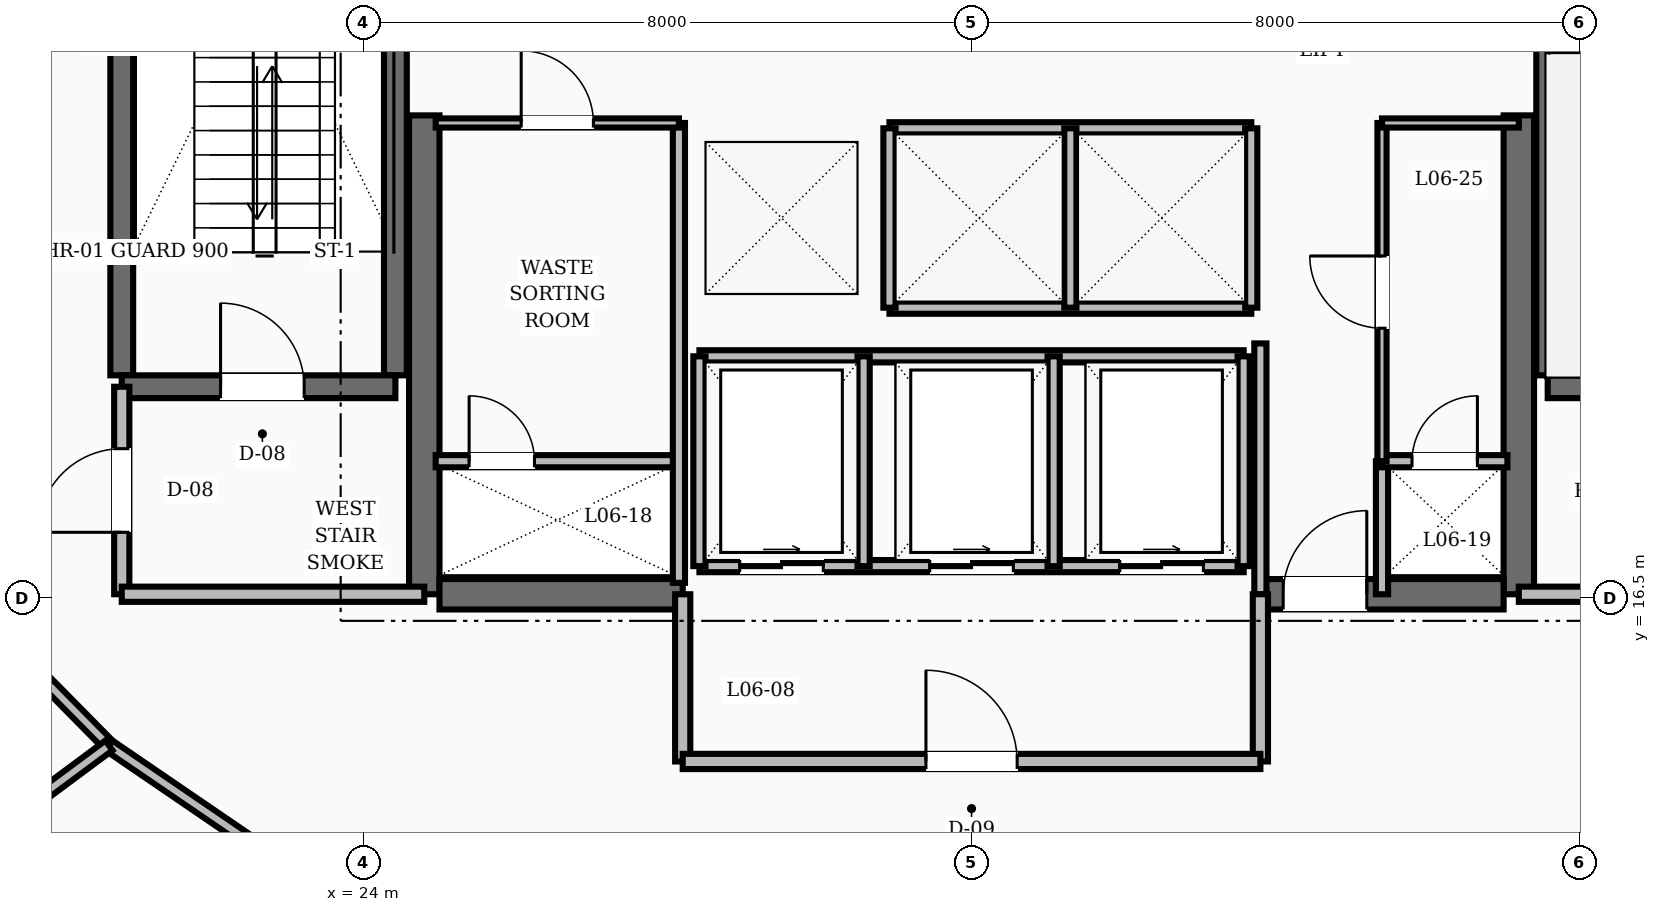
"""IFC4 building model, lengths in metres.
Left out: names, types, materials, properties, quantities, classifications, styles, units other than length and angle.
Written with IfcOpenShell. Run it as: python <this file> out.ifc"""

import sys

from ifc_helpers import new_model, si_unit, direction, frame, frame_2d, origin, place, context, subcontext, project, spatial, rectangle, extrude, element, fill, save


model = new_model("IFC4")
c1 = context("Model", 3, precision=1e-05, world=origin(), true_north=direction((0.0, 1.0)))
c2 = subcontext(c1, "Body", "Model", "MODEL_VIEW")
j1 = project(units=[si_unit("LENGTHUNIT", "METRE"), si_unit("PLANEANGLEUNIT", "RADIAN")], contexts=[c1])
p1 = place(None, origin())
s1 = spatial("IfcSite", under=j1, at=p1, CompositionType="ELEMENT")
p2 = place(p1, origin())
s2 = spatial("IfcBuilding", under=s1, at=p2, CompositionType="ELEMENT")
p3 = place(p2, frame((0.0, 0.0, 30.4)))
s3 = spatial("IfcBuildingStorey", under=s2, at=p3, CompositionType="ELEMENT", Elevation=30.4)
for number, where, z_axis, x_axis in (
    (1, (24.8, 16.55, 0.0), (0.0, 0.0, 1.0), (0.0, 1.0, 0.0)),
    (2, (39.2, 16.55, 0.0), (0.0, 0.0, 1.0), (0.0, 1.0, 0.0)),
):
    element("IfcWall", number, at=place(p3, frame(where, z_axis=z_axis, x_axis=x_axis)), inside=s3, PredefinedType="SHEAR", context=c2, shape_type="SweptSolid", body=[
        extrude(rectangle(XDim=6.3, YDim=0.4, at=frame_2d((3.15, 0.0))), origin(), (0.0, 0.0, 1.0), 3.6),
    ])
p4 = place(p3, frame((25.0, 16.55, 0.0), z_axis=(0.0, 0.0, 1.0), x_axis=(1.0, 0.0, 0.0)))
e3 = element("IfcWall", 3, at=p4, inside=s3, PredefinedType="SHEAR", context=c2, shape_type="SweptSolid", body=[
    extrude(rectangle(XDim=3.2, YDim=0.4, at=frame_2d((1.6, 0.0))), origin(), (0.0, 0.0, 1.0), 3.6),
])
p5 = place(p3, frame((35.8, 16.55, 0.0), z_axis=(0.0, 0.0, 1.0), x_axis=(1.0, 0.0, 0.0)))
e4 = element("IfcWall", 4, at=p5, inside=s3, PredefinedType="SHEAR", context=c2, shape_type="SweptSolid", body=[
    extrude(rectangle(XDim=3.2, YDim=0.4, at=frame_2d((1.6, 0.0))), origin(), (0.0, 0.0, 1.0), 3.6),
])
p6 = place(p5, frame((0.3, 0.0, 0.0)))
e5 = element("IfcOpeningElement", 5, at=p6, cuts=e4, PredefinedType="OPENING", context=c2, shape_type="SweptSolid", body=[
    extrude(rectangle(XDim=1.1, YDim=2.1, at=frame_2d((0.55, 1.05))), frame((0.0, 0.21, 0.0), z_axis=(0.0, -1.0, 0.0), x_axis=(1.0, 0.0, 0.0)), (0.0, 0.0, 1.0), 0.42),
])
for number, where, z_axis, x_axis in (
    (6, (20.82, 19.43, 0.0), (0.0, 0.0, 1.0), (0.0, 1.0, 0.0)),
    (7, (24.42, 19.43, 0.0), (0.0, 0.0, 1.0), (0.0, 1.0, 0.0)),
):
    element("IfcWall", number, at=place(p3, frame(where, z_axis=z_axis, x_axis=x_axis)), inside=s3, PredefinedType="SHEAR", context=c2, shape_type="SweptSolid", body=[
        extrude(rectangle(XDim=8.74, YDim=0.3, at=frame_2d((4.37, 0.0))), origin(), (0.0, 0.0, 1.0), 3.6),
    ])
p7 = place(p3, frame((20.82, 19.28, 0.0), z_axis=(0.0, 0.0, 1.0), x_axis=(1.0, 0.0, 0.0)))
e8 = element("IfcWall", 8, at=p7, inside=s3, PredefinedType="SHEAR", context=c2, shape_type="SweptSolid", body=[
    extrude(rectangle(XDim=3.6, YDim=0.3, at=frame_2d((1.8, 0.0))), origin(), (0.0, 0.0, 1.0), 3.6),
])
p8 = place(p7, frame((1.3, 0.0, 0.0)))
e9 = element("IfcOpeningElement", 9, at=p8, cuts=e8, PredefinedType="OPENING", context=c2, shape_type="SweptSolid", body=[
    extrude(rectangle(XDim=1.1, YDim=2.1, at=frame_2d((0.55, 1.05))), frame((0.0, 0.16, 0.0), z_axis=(0.0, -1.0, 0.0), x_axis=(1.0, 0.0, 0.0)), (0.0, 0.0, 1.0), 0.32),
])
p9 = place(p3, frame((39.58, 19.43, 0.0), z_axis=(0.0, 0.0, 1.0), x_axis=(0.0, 1.0, 0.0)))
e10 = element("IfcWall", 10, at=p9, inside=s3, PredefinedType="SHEAR", context=c2, shape_type="SweptSolid", body=[
    extrude(rectangle(XDim=8.74, YDim=0.3, at=frame_2d((4.37, 0.0))), origin(), (0.0, 0.0, 1.0), 3.6),
])
p10 = place(p3, frame((39.58, 19.28, 0.0), z_axis=(0.0, 0.0, 1.0), x_axis=(1.0, 0.0, 0.0)))
e11 = element("IfcWall", 11, at=p10, inside=s3, PredefinedType="SHEAR", context=c2, shape_type="SweptSolid", body=[
    extrude(rectangle(XDim=3.6, YDim=0.3, at=frame_2d((1.8, 0.0))), origin(), (0.0, 0.0, 1.0), 3.6),
])
p11 = place(p3, frame((20.82, 16.55, 0.0), z_axis=(0.0, 0.0, 1.0), x_axis=(0.0, 1.0, 0.0)))
e12 = element("IfcWall", 12, at=p11, inside=s3, PredefinedType="SOLIDWALL", context=c2, shape_type="SweptSolid", body=[
    extrude(rectangle(XDim=2.73, YDim=0.2, at=frame_2d((1.365, 0.0))), origin(), (0.0, 0.0, 1.0), 2.61),
])
p12 = place(p11, frame((0.815, 0.0, 0.0)))
e13 = element("IfcOpeningElement", 13, at=p12, cuts=e12, PredefinedType="OPENING", context=c2, shape_type="SweptSolid", body=[
    extrude(rectangle(XDim=1.1, YDim=2.1, at=frame_2d((0.55, 1.05))), frame((0.0, 0.11, 0.0), z_axis=(0.0, -1.0, 0.0), x_axis=(1.0, 0.0, 0.0)), (0.0, 0.0, 1.0), 0.22),
])
for number, where, z_axis, x_axis in (
    (14, (20.82, 16.55, 0.0), (0.0, 0.0, 1.0), (1.0, 0.0, 0.0)),
    (15, (39.2, 16.55, 0.0), (0.0, 0.0, 1.0), (1.0, 0.0, 0.0)),
):
    element("IfcWall", number, at=place(p3, frame(where, z_axis=z_axis, x_axis=x_axis)), inside=s3, PredefinedType="SOLIDWALL", context=c2, shape_type="SweptSolid", body=[
        extrude(rectangle(XDim=3.98, YDim=0.2, at=frame_2d((1.99, 0.0))), origin(), (0.0, 0.0, 1.0), 2.61),
    ])
p13 = place(p3, frame((35.8, 16.55, 0.0), z_axis=(0.0, 0.0, 1.0), x_axis=(0.0, 1.0, 0.0)))
e16 = element("IfcWall", 16, at=p13, inside=s3, PredefinedType="SOLIDWALL", context=c2, shape_type="SweptSolid", body=[
    extrude(rectangle(XDim=3.3, YDim=0.16, at=frame_2d((1.65, 0.0))), origin(), (0.0, 0.0, 1.0), 2.61),
])
p14 = place(p3, frame((37.4, 16.55, 0.0), z_axis=(0.0, 0.0, 1.0), x_axis=(0.0, 1.0, 0.0)))
e17 = element("IfcWall", 17, at=p14, inside=s3, PredefinedType="SOLIDWALL", context=c2, shape_type="SweptSolid", body=[
    extrude(rectangle(XDim=1.75, YDim=0.16, at=frame_2d((0.875, 0.0))), origin(), (0.0, 0.0, 1.0), 2.61),
])
for number, where, z_axis, x_axis in (
    (18, (28.2, 14.35, 0.0), (0.0, 0.0, 1.0), (0.0, 1.0, 0.0)),
    (19, (35.8, 14.35, 0.0), (0.0, 0.0, 1.0), (0.0, 1.0, 0.0)),
):
    element("IfcWall", number, at=place(p3, frame(where, z_axis=z_axis, x_axis=x_axis)), inside=s3, PredefinedType="SOLIDWALL", context=c2, shape_type="SweptSolid", body=[
        extrude(rectangle(XDim=2.2, YDim=0.2, at=frame_2d((1.1, 0.0))), origin(), (0.0, 0.0, 1.0), 2.61),
    ])
p15 = place(p3, frame((28.2, 14.35, 0.0), z_axis=(0.0, 0.0, 1.0), x_axis=(1.0, 0.0, 0.0)))
e20 = element("IfcWall", 20, at=p15, inside=s3, PredefinedType="SOLIDWALL", context=c2, shape_type="SweptSolid", body=[
    extrude(rectangle(XDim=7.6, YDim=0.2, at=frame_2d((3.8, 0.0))), origin(), (0.0, 0.0, 1.0), 2.61),
])
p16 = place(p15, frame((3.2, 0.0, 0.0)))
e21 = element("IfcOpeningElement", 21, at=p16, cuts=e20, PredefinedType="OPENING", context=c2, shape_type="SweptSolid", body=[
    extrude(rectangle(XDim=1.2, YDim=2.1, at=frame_2d((0.6, 1.05))), frame((0.0, 0.11, 0.0), z_axis=(0.0, -1.0, 0.0), x_axis=(1.0, 0.0, 0.0)), (0.0, 0.0, 1.0), 0.22),
])
for number, where, z_axis, x_axis in (
    (22, (30.92, 22.68, 0.0), (0.0, 0.0, 1.0), (1.0, 0.0, 0.0)),
    (23, (30.92, 20.32, 0.0), (0.0, 0.0, 1.0), (1.0, 0.0, 0.0)),
):
    element("IfcWall", number, at=place(p3, frame(where, z_axis=z_axis, x_axis=x_axis)), inside=s3, PredefinedType="SOLIDWALL", context=c2, shape_type="SweptSolid", body=[
        extrude(rectangle(XDim=4.76, YDim=0.16, at=frame_2d((2.38, 0.0))), origin(), (0.0, 0.0, 1.0), 2.61),
    ])
for number, where, z_axis, x_axis in (
    (24, (30.92, 20.32, 0.0), (0.0, 0.0, 1.0), (0.0, 1.0, 0.0)),
    (25, (33.3, 20.32, 0.0), (0.0, 0.0, 1.0), (0.0, 1.0, 0.0)),
    (26, (35.68, 20.32, 0.0), (0.0, 0.0, 1.0), (0.0, 1.0, 0.0)),
):
    element("IfcWall", number, at=place(p3, frame(where, z_axis=z_axis, x_axis=x_axis)), inside=s3, PredefinedType="SOLIDWALL", context=c2, shape_type="SweptSolid", body=[
        extrude(rectangle(XDim=2.36, YDim=0.16, at=frame_2d((1.18, 0.0))), origin(), (0.0, 0.0, 1.0), 2.61),
    ])
p17 = place(p3, frame((28.42, 16.92, 0.0), z_axis=(0.0, 0.0, 1.0), x_axis=(1.0, 0.0, 0.0)))
e27 = element("IfcWall", 27, at=p17, inside=s3, PredefinedType="SOLIDWALL", context=c2, shape_type="SweptSolid", body=[
    extrude(rectangle(XDim=7.16, YDim=0.16, at=frame_2d((3.58, 0.0))), origin(), (0.0, 0.0, 1.0), 2.61),
])
p18 = place(p17, frame((0.53, 0.0, 0.0)))
e28 = element("IfcOpeningElement", 28, at=p18, cuts=e27, PredefinedType="OPENING", context=c2, shape_type="SweptSolid", body=[
    extrude(rectangle(XDim=1.1, YDim=2.15, at=frame_2d((0.55, 1.075))), frame((0.0, 0.09, 0.0), z_axis=(0.0, -1.0, 0.0), x_axis=(1.0, 0.0, 0.0)), (0.0, 0.0, 1.0), 0.18),
])
p19 = place(p17, frame((3.03, 0.0, 0.0)))
e29 = element("IfcOpeningElement", 29, at=p19, cuts=e27, PredefinedType="OPENING", context=c2, shape_type="SweptSolid", body=[
    extrude(rectangle(XDim=1.1, YDim=2.15, at=frame_2d((0.55, 1.075))), frame((0.0, 0.09, 0.0), z_axis=(0.0, -1.0, 0.0), x_axis=(1.0, 0.0, 0.0)), (0.0, 0.0, 1.0), 0.18),
])
p20 = place(p17, frame((5.53, 0.0, 0.0)))
e30 = element("IfcOpeningElement", 30, at=p20, cuts=e27, PredefinedType="OPENING", context=c2, shape_type="SweptSolid", body=[
    extrude(rectangle(XDim=1.1, YDim=2.15, at=frame_2d((0.55, 1.075))), frame((0.0, 0.09, 0.0), z_axis=(0.0, -1.0, 0.0), x_axis=(1.0, 0.0, 0.0)), (0.0, 0.0, 1.0), 0.18),
])
p21 = place(p3, frame((28.42, 19.68, 0.0), z_axis=(0.0, 0.0, 1.0), x_axis=(1.0, 0.0, 0.0)))
e31 = element("IfcWall", 31, at=p21, inside=s3, PredefinedType="SOLIDWALL", context=c2, shape_type="SweptSolid", body=[
    extrude(rectangle(XDim=7.16, YDim=0.16, at=frame_2d((3.58, 0.0))), origin(), (0.0, 0.0, 1.0), 2.61),
])
for number, where, z_axis, x_axis in (
    (32, (28.42, 16.92, 0.0), (0.0, 0.0, 1.0), (0.0, 1.0, 0.0)),
    (33, (30.58, 16.92, 0.0), (0.0, 0.0, 1.0), (0.0, 1.0, 0.0)),
    (34, (33.08, 16.92, 0.0), (0.0, 0.0, 1.0), (0.0, 1.0, 0.0)),
    (35, (35.58, 16.92, 0.0), (0.0, 0.0, 1.0), (0.0, 1.0, 0.0)),
):
    element("IfcWall", number, at=place(p3, frame(where, z_axis=z_axis, x_axis=x_axis)), inside=s3, PredefinedType="SOLIDWALL", context=c2, shape_type="SweptSolid", body=[
        extrude(rectangle(XDim=2.76, YDim=0.16, at=frame_2d((1.38, 0.0))), origin(), (0.0, 0.0, 1.0), 2.61),
    ])
p22 = place(p3, frame((24.95, 18.3, 0.0), z_axis=(0.0, 0.0, 1.0), x_axis=(1.0, 0.0, 0.0)))
e36 = element("IfcWall", 36, at=p22, inside=s3, PredefinedType="SOLIDWALL", context=c2, shape_type="SweptSolid", body=[
    extrude(rectangle(XDim=3.2, YDim=0.16, at=frame_2d((1.6, 0.0))), origin(), (0.0, 0.0, 1.0), 2.61),
])
p23 = place(p22, frame((0.44, 0.0, 0.0)))
e37 = element("IfcOpeningElement", 37, at=p23, cuts=e36, PredefinedType="OPENING", context=c2, shape_type="SweptSolid", body=[
    extrude(rectangle(XDim=0.86, YDim=2.05, at=frame_2d((0.43, 1.025))), frame((0.0, 0.09, 0.0), z_axis=(0.0, -1.0, 0.0), x_axis=(1.0, 0.0, 0.0)), (0.0, 0.0, 1.0), 0.18),
])
p24 = place(p3, frame((28.15, 16.7, 0.0), z_axis=(0.0, 0.0, 1.0), x_axis=(0.0, 1.0, 0.0)))
e38 = element("IfcWall", 38, at=p24, inside=s3, PredefinedType="SOLIDWALL", context=c2, shape_type="SweptSolid", body=[
    extrude(rectangle(XDim=6.05, YDim=0.16, at=frame_2d((3.025, 0.0))), origin(), (0.0, 0.0, 1.0), 2.61),
])
p25 = place(p3, frame((37.4, 18.3, 0.0), z_axis=(0.0, 0.0, 1.0), x_axis=(1.0, 0.0, 0.0)))
e39 = element("IfcWall", 39, at=p25, inside=s3, PredefinedType="SOLIDWALL", context=c2, shape_type="SweptSolid", body=[
    extrude(rectangle(XDim=1.65, YDim=0.16, at=frame_2d((0.825, 0.0))), origin(), (0.0, 0.0, 1.0), 2.61),
])
p26 = place(p25, frame((0.395, 0.0, 0.0)))
e40 = element("IfcOpeningElement", 40, at=p26, cuts=e39, PredefinedType="OPENING", context=c2, shape_type="SweptSolid", body=[
    extrude(rectangle(XDim=0.86, YDim=2.1, at=frame_2d((0.43, 1.05))), frame((0.0, 0.09, 0.0), z_axis=(0.0, -1.0, 0.0), x_axis=(1.0, 0.0, 0.0)), (0.0, 0.0, 1.0), 0.18),
])
p27 = place(p3, frame((24.95, 22.75, 0.0), z_axis=(0.0, 0.0, 1.0), x_axis=(1.0, 0.0, 0.0)))
e41 = element("IfcWall", 41, at=p27, inside=s3, PredefinedType="PARTITIONING", context=c2, shape_type="SweptSolid", body=[
    extrude(rectangle(XDim=3.2, YDim=0.12, at=frame_2d((1.6, 0.0))), origin(), (0.0, 0.0, 1.0), 2.61),
])
p28 = place(p27, frame((1.125, 0.0, 0.0)))
e42 = element("IfcOpeningElement", 42, at=p28, cuts=e41, PredefinedType="OPENING", context=c2, shape_type="SweptSolid", body=[
    extrude(rectangle(XDim=0.95, YDim=2.1, at=frame_2d((0.475, 1.05))), frame((0.0, 0.07, 0.0), z_axis=(0.0, -1.0, 0.0), x_axis=(1.0, 0.0, 0.0)), (0.0, 0.0, 1.0), 0.14),
])
p29 = place(p3, frame((37.4, 18.3, 0.0), z_axis=(0.0, 0.0, 1.0), x_axis=(0.0, 1.0, 0.0)))
e43 = element("IfcWall", 43, at=p29, inside=s3, PredefinedType="PARTITIONING", context=c2, shape_type="SweptSolid", body=[
    extrude(rectangle(XDim=4.45, YDim=0.12, at=frame_2d((2.225, 0.0))), origin(), (0.0, 0.0, 1.0), 2.61),
])
p30 = place(p29, frame((1.75, 0.0, 0.0)))
e44 = element("IfcOpeningElement", 44, at=p30, cuts=e43, PredefinedType="OPENING", context=c2, shape_type="SweptSolid", body=[
    extrude(rectangle(XDim=0.95, YDim=2.1, at=frame_2d((0.475, 1.05))), frame((0.0, 0.07, 0.0), z_axis=(0.0, -1.0, 0.0), x_axis=(1.0, 0.0, 0.0)), (0.0, 0.0, 1.0), 0.14),
])
p31 = place(p3, frame((37.4, 22.75, 0.0), z_axis=(0.0, 0.0, 1.0), x_axis=(1.0, 0.0, 0.0)))
e45 = element("IfcWall", 45, at=p31, inside=s3, PredefinedType="PARTITIONING", context=c2, shape_type="SweptSolid", body=[
    extrude(rectangle(XDim=1.8, YDim=0.12, at=frame_2d((0.9, 0.0))), origin(), (0.0, 0.0, 1.0), 2.61),
])
p32 = place(p3, frame((18.655, 16.583, 0.0), z_axis=(0.0, 0.0, 1.0), x_axis=(0.702366174226, -0.711815816981, 0.0)))
e46 = element("IfcWall", 46, at=p32, inside=s3, PredefinedType="SOLIDWALL", context=c2, shape_type="SweptSolid", body=[
    extrude(rectangle(XDim=2.842, YDim=0.16, at=frame_2d((1.421, 0.0))), origin(), (0.0, 0.0, 1.0), 2.61),
])
p33 = place(p3, frame((20.651, 14.56, 0.0), z_axis=(0.0, 0.0, 1.0), x_axis=(0.825929039072, -0.563774088104, 0.0)))
e47 = element("IfcWall", 47, at=p33, inside=s3, PredefinedType="SOLIDWALL", context=c2, shape_type="SweptSolid", body=[
    extrude(rectangle(XDim=2.945, YDim=0.16, at=frame_2d((1.472, 0.0))), origin(), (0.0, 0.0, 1.0), 2.61),
])
p34 = place(p3, frame((20.651, 14.56, 0.0), z_axis=(0.0, 0.0, 1.0), x_axis=(-0.802903631364, -0.596108848065, 0.0)))
e48 = element("IfcWall", 48, at=p34, inside=s3, PredefinedType="SOLIDWALL", context=c2, shape_type="SweptSolid", body=[
    extrude(rectangle(XDim=7.814, YDim=0.16, at=frame_2d((3.907, 0.0))), origin(), (0.0, 0.0, 1.0), 2.61),
])
p35 = place(p8, origin())
e49 = element("IfcDoor", 49, at=p35, inside=s3, OperationType="SINGLE_SWING_LEFT", PredefinedType="DOOR", context=c2, shape_type="SweptSolid", body=[
    extrude(rectangle(XDim=1.1, YDim=2.1, at=frame_2d((0.55, 1.05))), frame((0.0, 0.025, 0.0), z_axis=(0.0, -1.0, 0.0), x_axis=(1.0, 0.0, 0.0)), (0.0, 0.0, 1.0), 0.05),
])
fill(e9, e49)
p36 = place(p12, origin())
e50 = element("IfcDoor", 50, at=p36, inside=s3, OperationType="SINGLE_SWING_LEFT", PredefinedType="DOOR", context=c2, shape_type="SweptSolid", body=[
    extrude(rectangle(XDim=1.1, YDim=2.1, at=frame_2d((0.55, 1.05))), frame((0.0, 0.025, 0.0), z_axis=(0.0, -1.0, 0.0), x_axis=(1.0, 0.0, 0.0)), (0.0, 0.0, 1.0), 0.05),
])
fill(e13, e50)
p37 = place(p6, origin())
e51 = element("IfcDoor", 51, at=p37, inside=s3, OperationType="SINGLE_SWING_RIGHT", PredefinedType="DOOR", context=c2, shape_type="SweptSolid", body=[
    extrude(rectangle(XDim=1.1, YDim=2.1, at=frame_2d((0.55, 1.05))), frame((0.0, 0.025, 0.0), z_axis=(0.0, -1.0, 0.0), x_axis=(1.0, 0.0, 0.0)), (0.0, 0.0, 1.0), 0.05),
])
fill(e5, e51)
p38 = place(p16, origin())
e52 = element("IfcDoor", 52, at=p38, inside=s3, OperationType="SINGLE_SWING_LEFT", PredefinedType="DOOR", context=c2, shape_type="SweptSolid", body=[
    extrude(rectangle(XDim=1.2, YDim=2.1, at=frame_2d((0.6, 1.05))), frame((0.0, 0.025, 0.0), z_axis=(0.0, -1.0, 0.0), x_axis=(1.0, 0.0, 0.0)), (0.0, 0.0, 1.0), 0.05),
])
fill(e21, e52)
p39 = place(p18, origin())
e53 = element("IfcDoor", 53, at=p39, inside=s3, OperationType="SLIDING_TO_RIGHT", PredefinedType="DOOR", context=c2, shape_type="SweptSolid", body=[
    extrude(rectangle(XDim=1.1, YDim=2.15, at=frame_2d((0.55, 1.075))), frame((0.0, 0.025, 0.0), z_axis=(0.0, -1.0, 0.0), x_axis=(1.0, 0.0, 0.0)), (0.0, 0.0, 1.0), 0.05),
])
fill(e28, e53)
p40 = place(p19, origin())
e54 = element("IfcDoor", 54, at=p40, inside=s3, OperationType="SLIDING_TO_RIGHT", PredefinedType="DOOR", context=c2, shape_type="SweptSolid", body=[
    extrude(rectangle(XDim=1.1, YDim=2.15, at=frame_2d((0.55, 1.075))), frame((0.0, 0.025, 0.0), z_axis=(0.0, -1.0, 0.0), x_axis=(1.0, 0.0, 0.0)), (0.0, 0.0, 1.0), 0.05),
])
fill(e29, e54)
p41 = place(p20, origin())
e55 = element("IfcDoor", 55, at=p41, inside=s3, OperationType="SLIDING_TO_RIGHT", PredefinedType="DOOR", context=c2, shape_type="SweptSolid", body=[
    extrude(rectangle(XDim=1.1, YDim=2.15, at=frame_2d((0.55, 1.075))), frame((0.0, 0.025, 0.0), z_axis=(0.0, -1.0, 0.0), x_axis=(1.0, 0.0, 0.0)), (0.0, 0.0, 1.0), 0.05),
])
fill(e30, e55)
p42 = place(p23, origin())
e56 = element("IfcDoor", 56, at=p42, inside=s3, OperationType="SINGLE_SWING_LEFT", PredefinedType="TRAPDOOR", context=c2, shape_type="SweptSolid", body=[
    extrude(rectangle(XDim=0.86, YDim=2.05, at=frame_2d((0.43, 1.025))), frame((0.0, 0.025, 0.0), z_axis=(0.0, -1.0, 0.0), x_axis=(1.0, 0.0, 0.0)), (0.0, 0.0, 1.0), 0.05),
])
fill(e37, e56)
p43 = place(p26, origin())
e57 = element("IfcDoor", 57, at=p43, inside=s3, OperationType="SINGLE_SWING_RIGHT", PredefinedType="TRAPDOOR", context=c2, shape_type="SweptSolid", body=[
    extrude(rectangle(XDim=0.86, YDim=2.1, at=frame_2d((0.43, 1.05))), frame((0.0, 0.025, 0.0), z_axis=(0.0, -1.0, 0.0), x_axis=(1.0, 0.0, 0.0)), (0.0, 0.0, 1.0), 0.05),
])
fill(e40, e57)
p44 = place(p28, origin())
e58 = element("IfcDoor", 58, at=p44, inside=s3, OperationType="SINGLE_SWING_LEFT", PredefinedType="DOOR", context=c2, shape_type="SweptSolid", body=[
    extrude(rectangle(XDim=0.95, YDim=2.1, at=frame_2d((0.475, 1.05))), frame((0.0, 0.025, 0.0), z_axis=(0.0, -1.0, 0.0), x_axis=(1.0, 0.0, 0.0)), (0.0, 0.0, 1.0), 0.05),
])
fill(e42, e58)
p45 = place(p30, origin())
e59 = element("IfcDoor", 59, at=p45, inside=s3, OperationType="SINGLE_SWING_RIGHT", PredefinedType="DOOR", context=c2, shape_type="SweptSolid", body=[
    extrude(rectangle(XDim=0.95, YDim=2.1, at=frame_2d((0.475, 1.05))), frame((0.0, 0.025, 0.0), z_axis=(0.0, -1.0, 0.0), x_axis=(1.0, 0.0, 0.0)), (0.0, 0.0, 1.0), 0.05),
])
fill(e44, e59)
save(model, sys.argv[1])
